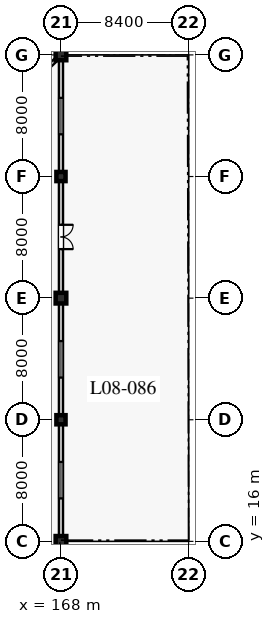
"""IFC4 building model, lengths in metres.
Left out: names, types, materials, properties, quantities, classifications, styles, units other than length and angle.
Written with IfcOpenShell. Run it as: python <this file> out.ifc"""

import sys

from ifc_helpers import new_model, si_unit, direction, frame, frame_2d, origin, origin_2d, place, context, subcontext, project, spatial, rectangle, extrude, element, fill, save


model = new_model("IFC4")
c1 = context("Model", 3, precision=1e-05, world=origin(), true_north=direction((0.0, 1.0)))
c2 = subcontext(c1, "Body", "Model", "MODEL_VIEW")
j1 = project(units=[si_unit("LENGTHUNIT", "METRE"), si_unit("PLANEANGLEUNIT", "RADIAN")], contexts=[c1])
p1 = place(None, origin())
s1 = spatial("IfcSite", under=j1, at=p1, CompositionType="ELEMENT")
p2 = place(p1, origin())
s2 = spatial("IfcBuilding", under=s1, at=p2, CompositionType="ELEMENT")
p3 = place(p2, frame((0.0, 0.0, 36.0)))
s3 = spatial("IfcBuildingStorey", under=s2, at=p3, CompositionType="ELEMENT", Elevation=36.0)
for number, where, z_axis, x_axis in (
    (1, (168.0, 16.0, 0.0), (0.0, 0.0, 1.0), (1.0, 0.0, 0.0)),
    (2, (168.0, 32.0, 0.0), (0.0, 0.0, 1.0), (1.0, 0.0, 0.0)),
    (3, (168.0, 48.0, 0.0), (0.0, 0.0, 1.0), (1.0, 0.0, 0.0)),
):
    element("IfcColumn", number, at=place(p3, frame(where, z_axis=z_axis, x_axis=x_axis)), inside=s3, PredefinedType="COLUMN", context=c2, shape_type="SweptSolid", body=[
        extrude(rectangle(XDim=0.7, YDim=0.7, at=origin_2d()), origin(), (0.0, 0.0, 1.0), 3.6),
    ])
for number, where, z_axis, x_axis in (
    (4, (168.0, 24.0, 0.0), (0.0, 0.0, 1.0), (1.0, 0.0, 0.0)),
    (5, (168.0, 40.0, 0.0), (0.0, 0.0, 1.0), (1.0, 0.0, 0.0)),
):
    element("IfcColumn", number, at=place(p3, frame(where, z_axis=z_axis, x_axis=x_axis)), inside=s3, PredefinedType="COLUMN", context=c2, shape_type="SweptSolid", body=[
        extrude(rectangle(XDim=0.6, YDim=0.6, at=origin_2d()), origin(), (0.0, 0.0, 1.0), 3.6),
    ])
p4 = place(p3, frame((159.95, 40.333, 0.0), z_axis=(0.0, 0.0, 1.0), x_axis=(0.724105170588, 0.689689569247, 0.0)))
e6 = element("IfcWall", 6, at=p4, inside=s3, PredefinedType="SOLIDWALL", context=c2, shape_type="SweptSolid", body=[
    extrude(rectangle(XDim=10.634, YDim=0.24, at=frame_2d((5.317, 0.0))), origin(), (0.0, 0.0, 1.0), 2.94),
])
p5 = place(p4, frame((2.383, 0.0, 0.8)))
e7 = element("IfcOpeningElement", 7, at=p5, cuts=e6, PredefinedType="OPENING", context=c2, shape_type="SweptSolid", body=[
    extrude(rectangle(XDim=2.0, YDim=1.75, at=frame_2d((1.0, 0.875))), frame((0.0, 0.13, 0.0), z_axis=(0.0, -1.0, 0.0), x_axis=(1.0, 0.0, 0.0)), (0.0, 0.0, 1.0), 0.26),
])
p6 = place(p4, frame((6.803, 0.0, 0.8)))
e8 = element("IfcOpeningElement", 8, at=p6, cuts=e6, PredefinedType="OPENING", context=c2, shape_type="SweptSolid", body=[
    extrude(rectangle(XDim=2.0, YDim=1.75, at=frame_2d((1.0, 0.875))), frame((0.0, 0.13, 0.0), z_axis=(0.0, -1.0, 0.0), x_axis=(1.0, 0.0, 0.0)), (0.0, 0.0, 1.0), 0.26),
])
p7 = place(p3, frame((168.0, 47.65, 0.0), z_axis=(0.0, 0.0, 1.0), x_axis=(0.0, -1.0, 0.0)))
e9 = element("IfcWall", 9, at=p7, inside=s3, PredefinedType="SOLIDWALL", context=c2, shape_type="SweptSolid", body=[
    extrude(rectangle(XDim=7.35, YDim=0.28, at=frame_2d((3.675, 0.0))), origin(), (0.0, 0.0, 1.0), 2.7),
])
p8 = place(p7, frame((2.475, 0.0, 0.5)))
e10 = element("IfcOpeningElement", 10, at=p8, cuts=e9, PredefinedType="OPENING", context=c2, shape_type="SweptSolid", body=[
    extrude(rectangle(XDim=2.4, YDim=1.65, at=frame_2d((1.2, 0.825))), frame((0.0, 0.15, 0.0), z_axis=(0.0, -1.0, 0.0), x_axis=(1.0, 0.0, 0.0)), (0.0, 0.0, 1.0), 0.3),
])
p9 = place(p3, frame((168.0, 39.7, 0.0), z_axis=(0.0, 0.0, 1.0), x_axis=(0.0, -1.0, 0.0)))
e11 = element("IfcWall", 11, at=p9, inside=s3, PredefinedType="SOLIDWALL", context=c2, shape_type="SweptSolid", body=[
    extrude(rectangle(XDim=7.35, YDim=0.28, at=frame_2d((3.675, 0.0))), origin(), (0.0, 0.0, 1.0), 2.7),
])
p10 = place(p9, frame((2.875, 0.0, 0.0)))
e12 = element("IfcOpeningElement", 12, at=p10, cuts=e11, PredefinedType="OPENING", context=c2, shape_type="SweptSolid", body=[
    extrude(rectangle(XDim=1.6, YDim=2.25, at=frame_2d((0.8, 1.125))), frame((0.0, 0.15, 0.0), z_axis=(0.0, -1.0, 0.0), x_axis=(1.0, 0.0, 0.0)), (0.0, 0.0, 1.0), 0.3),
])
p11 = place(p3, frame((168.0, 31.65, 0.0), z_axis=(0.0, 0.0, 1.0), x_axis=(0.0, -1.0, 0.0)))
e13 = element("IfcWall", 13, at=p11, inside=s3, PredefinedType="SOLIDWALL", context=c2, shape_type="SweptSolid", body=[
    extrude(rectangle(XDim=7.35, YDim=0.28, at=frame_2d((3.675, 0.0))), origin(), (0.0, 0.0, 1.0), 2.7),
])
p12 = place(p11, frame((2.475, 0.0, 0.5)))
e14 = element("IfcOpeningElement", 14, at=p12, cuts=e13, PredefinedType="OPENING", context=c2, shape_type="SweptSolid", body=[
    extrude(rectangle(XDim=2.4, YDim=1.65, at=frame_2d((1.2, 0.825))), frame((0.0, 0.15, 0.0), z_axis=(0.0, -1.0, 0.0), x_axis=(1.0, 0.0, 0.0)), (0.0, 0.0, 1.0), 0.3),
])
p13 = place(p3, frame((168.0, 23.7, 0.0), z_axis=(0.0, 0.0, 1.0), x_axis=(0.0, -1.0, 0.0)))
e15 = element("IfcWall", 15, at=p13, inside=s3, PredefinedType="SOLIDWALL", context=c2, shape_type="SweptSolid", body=[
    extrude(rectangle(XDim=7.35, YDim=0.28, at=frame_2d((3.675, 0.0))), origin(), (0.0, 0.0, 1.0), 2.7),
])
p14 = place(p13, frame((2.475, 0.0, 0.5)))
e16 = element("IfcOpeningElement", 16, at=p14, cuts=e15, PredefinedType="OPENING", context=c2, shape_type="SweptSolid", body=[
    extrude(rectangle(XDim=2.4, YDim=1.65, at=frame_2d((1.2, 0.825))), frame((0.0, 0.15, 0.0), z_axis=(0.0, -1.0, 0.0), x_axis=(1.0, 0.0, 0.0)), (0.0, 0.0, 1.0), 0.3),
])
p15 = place(p8, origin())
e17 = element("IfcWindow", 17, at=p15, inside=s3, PartitioningType="DOUBLE_PANEL_VERTICAL", PredefinedType="WINDOW", context=c2, shape_type="SweptSolid", body=[
    extrude(rectangle(XDim=2.4, YDim=1.65, at=frame_2d((1.2, 0.825))), frame((0.0, 0.03, 0.0), z_axis=(0.0, -1.0, 0.0), x_axis=(1.0, 0.0, 0.0)), (0.0, 0.0, 1.0), 0.06),
])
fill(e10, e17)
p16 = place(p10, origin())
e18 = element("IfcDoor", 18, at=p16, inside=s3, OperationType="DOUBLE_DOOR_SINGLE_SWING", PredefinedType="DOOR", context=c2, shape_type="SweptSolid", body=[
    extrude(rectangle(XDim=1.6, YDim=2.25, at=frame_2d((0.8, 1.125))), frame((0.0, 0.025, 0.0), z_axis=(0.0, -1.0, 0.0), x_axis=(1.0, 0.0, 0.0)), (0.0, 0.0, 1.0), 0.05),
])
fill(e12, e18)
p17 = place(p12, origin())
e19 = element("IfcWindow", 19, at=p17, inside=s3, PartitioningType="DOUBLE_PANEL_VERTICAL", PredefinedType="WINDOW", context=c2, shape_type="SweptSolid", body=[
    extrude(rectangle(XDim=2.4, YDim=1.65, at=frame_2d((1.2, 0.825))), frame((0.0, 0.03, 0.0), z_axis=(0.0, -1.0, 0.0), x_axis=(1.0, 0.0, 0.0)), (0.0, 0.0, 1.0), 0.06),
])
fill(e14, e19)
p18 = place(p14, origin())
e20 = element("IfcWindow", 20, at=p18, inside=s3, PartitioningType="DOUBLE_PANEL_VERTICAL", PredefinedType="WINDOW", context=c2, shape_type="SweptSolid", body=[
    extrude(rectangle(XDim=2.4, YDim=1.65, at=frame_2d((1.2, 0.825))), frame((0.0, 0.03, 0.0), z_axis=(0.0, -1.0, 0.0), x_axis=(1.0, 0.0, 0.0)), (0.0, 0.0, 1.0), 0.06),
])
fill(e16, e20)
save(model, sys.argv[1])
